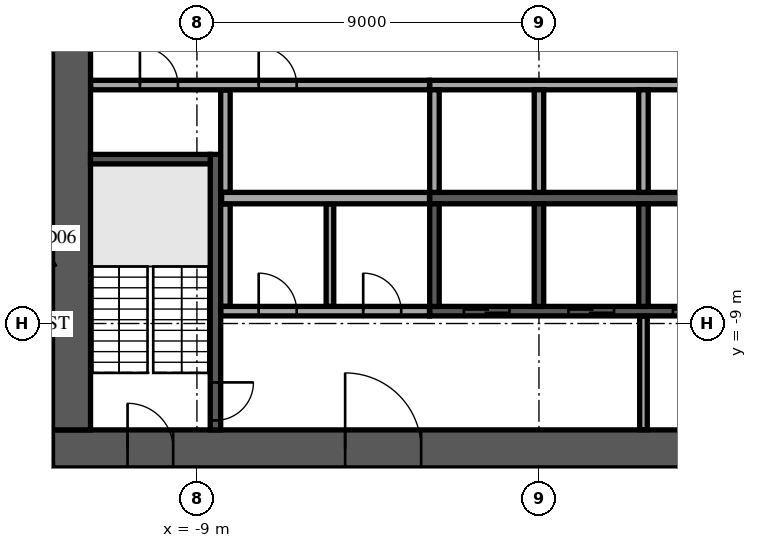
"""IFC4 building model, lengths in metres.
Left out: names, types, materials, properties, quantities, classifications, styles, units other than length and angle.
Written with IfcOpenShell. Run it as: python <this file> out.ifc"""

import sys

from ifc_helpers import new_model, si_unit, direction, frame, frame_2d, origin, place, context, subcontext, project, spatial, rectangle, extrude, element, fill, save


model = new_model("IFC4")
c1 = context("Model", 3, precision=1e-05, world=origin(), true_north=direction((0.0, 1.0)))
c2 = subcontext(c1, "Body", "Model", "MODEL_VIEW")
j1 = project(units=[si_unit("LENGTHUNIT", "METRE"), si_unit("PLANEANGLEUNIT", "RADIAN")], contexts=[c1])
p1 = place(None, origin())
s1 = spatial("IfcSite", under=j1, at=p1, CompositionType="ELEMENT")
p2 = place(p1, origin())
s2 = spatial("IfcBuilding", under=s1, at=p2, CompositionType="ELEMENT")
p3 = place(p2, frame((0.0, 0.0, 147.7)))
s3 = spatial("IfcBuildingStorey", under=s2, at=p3, CompositionType="ELEMENT", Elevation=147.7)
p4 = place(p3, frame((-12.8, -12.3, 0.0), z_axis=(0.0, 0.0, 1.0), x_axis=(1.0, 0.0, 0.0)))
e1 = element("IfcWall", 1, at=p4, inside=s3, PredefinedType="SHEAR", context=c2, shape_type="SweptSolid", body=[
    extrude(rectangle(XDim=25.6, YDim=1.0, at=frame_2d((12.8, 0.0))), origin(), (0.0, 0.0, 1.0), 3.6),
])
p5 = place(p4, frame((7.7, 0.0, 0.0)))
e2 = element("IfcOpeningElement", 2, at=p5, cuts=e1, PredefinedType="OPENING", context=c2, shape_type="SweptSolid", body=[
    extrude(rectangle(XDim=2.0, YDim=2.1, at=frame_2d((1.0, 1.05))), frame((0.0, 0.51, 0.0), z_axis=(0.0, -1.0, 0.0), x_axis=(1.0, 0.0, 0.0)), (0.0, 0.0, 1.0), 1.02),
])
p6 = place(p4, frame((17.825, 0.0, 0.0)))
e3 = element("IfcOpeningElement", 3, at=p6, cuts=e1, PredefinedType="OPENING", context=c2, shape_type="SweptSolid", body=[
    extrude(rectangle(XDim=1.2, YDim=2.1, at=frame_2d((0.6, 1.05))), frame((0.0, 0.51, 0.0), z_axis=(0.0, -1.0, 0.0), x_axis=(1.0, 0.0, 0.0)), (0.0, 0.0, 1.0), 1.02),
])
p7 = place(p4, frame((1.975, 0.0, 0.0)))
e4 = element("IfcOpeningElement", 4, at=p7, cuts=e1, PredefinedType="OPENING", context=c2, shape_type="SweptSolid", body=[
    extrude(rectangle(XDim=1.2, YDim=2.1, at=frame_2d((0.6, 1.05))), frame((0.0, 0.51, 0.0), z_axis=(0.0, -1.0, 0.0), x_axis=(1.0, 0.0, 0.0)), (0.0, 0.0, 1.0), 1.02),
])
p8 = place(p4, frame((22.425, 0.0, 0.0)))
e5 = element("IfcOpeningElement", 5, at=p8, cuts=e1, PredefinedType="OPENING", context=c2, shape_type="SweptSolid", body=[
    extrude(rectangle(XDim=1.2, YDim=2.1, at=frame_2d((0.6, 1.05))), frame((0.0, 0.51, 0.0), z_axis=(0.0, -1.0, 0.0), x_axis=(1.0, 0.0, 0.0)), (0.0, 0.0, 1.0), 1.02),
])
p9 = place(p3, frame((-12.3, -11.8, 0.0), z_axis=(0.0, 0.0, 1.0), x_axis=(0.0, 1.0, 0.0)))
e6 = element("IfcWall", 6, at=p9, inside=s3, PredefinedType="SHEAR", context=c2, shape_type="SweptSolid", body=[
    extrude(rectangle(XDim=23.6, YDim=1.0, at=frame_2d((11.8, 0.0))), origin(), (0.0, 0.0, 1.0), 3.6),
])
p10 = place(p9, frame((10.6, 0.0, 0.0)))
e7 = element("IfcOpeningElement", 7, at=p10, cuts=e6, PredefinedType="OPENING", context=c2, shape_type="SweptSolid", body=[
    extrude(rectangle(XDim=2.4, YDim=2.4, at=frame_2d((1.2, 1.2))), frame((0.0, 0.51, 0.0), z_axis=(0.0, -1.0, 0.0), x_axis=(1.0, 0.0, 0.0)), (0.0, 0.0, 1.0), 1.02),
])
p11 = place(p3, frame((-2.875, -5.7, 0.0), z_axis=(0.0, 0.0, 1.0), x_axis=(1.0, 0.0, 0.0)))
e8 = element("IfcWall", 8, at=p11, inside=s3, PredefinedType="SOLIDWALL", context=c2, shape_type="SweptSolid", body=[
    extrude(rectangle(XDim=11.25, YDim=0.3, at=frame_2d((5.625, 0.0))), origin(), (0.0, 0.0, 1.0), 3.6),
])
p12 = place(p3, frame((-2.875, -2.725, 0.0), z_axis=(0.0, 0.0, 1.0), x_axis=(1.0, 0.0, 0.0)))
e9 = element("IfcWall", 9, at=p12, inside=s3, PredefinedType="SOLIDWALL", context=c2, shape_type="SweptSolid", body=[
    extrude(rectangle(XDim=8.5, YDim=0.25, at=frame_2d((4.25, 0.0))), origin(), (0.0, 0.0, 1.0), 3.6),
])
for number, where, z_axis, x_axis in (
    (10, (-2.75, -5.55, 0.0), (0.0, 0.0, 1.0), (0.0, 1.0, 0.0)),
    (11, (0.0, -5.55, 0.0), (0.0, 0.0, 1.0), (0.0, 1.0, 0.0)),
    (12, (2.75, -5.55, 0.0), (0.0, 0.0, 1.0), (0.0, 1.0, 0.0)),
):
    element("IfcWall", number, at=place(p3, frame(where, z_axis=z_axis, x_axis=x_axis)), inside=s3, PredefinedType="SOLIDWALL", context=c2, shape_type="SweptSolid", body=[
        extrude(rectangle(XDim=2.7, YDim=0.25, at=frame_2d((1.35, 0.0))), origin(), (0.0, 0.0, 1.0), 3.6),
    ])
p13 = place(p3, frame((-2.875, -8.675, 0.0), z_axis=(0.0, 0.0, 1.0), x_axis=(1.0, 0.0, 0.0)))
e13 = element("IfcWall", 13, at=p13, inside=s3, PredefinedType="SOLIDWALL", context=c2, shape_type="SweptSolid", body=[
    extrude(rectangle(XDim=11.25, YDim=0.25, at=frame_2d((5.625, 0.0))), origin(), (0.0, 0.0, 1.0), 3.6),
])
p14 = place(p13, frame((0.9, 0.0, 0.0)))
e14 = element("IfcOpeningElement", 14, at=p14, cuts=e13, PredefinedType="OPENING", context=c2, shape_type="SweptSolid", body=[
    extrude(rectangle(XDim=1.2, YDim=2.1, at=frame_2d((0.6, 1.05))), frame((0.0, 0.135, 0.0), z_axis=(0.0, -1.0, 0.0), x_axis=(1.0, 0.0, 0.0)), (0.0, 0.0, 1.0), 0.27),
])
p15 = place(p13, frame((3.65, 0.0, 0.0)))
e15 = element("IfcOpeningElement", 15, at=p15, cuts=e13, PredefinedType="OPENING", context=c2, shape_type="SweptSolid", body=[
    extrude(rectangle(XDim=1.2, YDim=2.1, at=frame_2d((0.6, 1.05))), frame((0.0, 0.135, 0.0), z_axis=(0.0, -1.0, 0.0), x_axis=(1.0, 0.0, 0.0)), (0.0, 0.0, 1.0), 0.27),
])
p16 = place(p13, frame((6.4, 0.0, 0.0)))
e16 = element("IfcOpeningElement", 16, at=p16, cuts=e13, PredefinedType="OPENING", context=c2, shape_type="SweptSolid", body=[
    extrude(rectangle(XDim=1.2, YDim=2.1, at=frame_2d((0.6, 1.05))), frame((0.0, 0.135, 0.0), z_axis=(0.0, -1.0, 0.0), x_axis=(1.0, 0.0, 0.0)), (0.0, 0.0, 1.0), 0.27),
])
p17 = place(p13, frame((9.15, 0.0, 0.0)))
e17 = element("IfcOpeningElement", 17, at=p17, cuts=e13, PredefinedType="OPENING", context=c2, shape_type="SweptSolid", body=[
    extrude(rectangle(XDim=1.2, YDim=2.1, at=frame_2d((0.6, 1.05))), frame((0.0, 0.135, 0.0), z_axis=(0.0, -1.0, 0.0), x_axis=(1.0, 0.0, 0.0)), (0.0, 0.0, 1.0), 0.27),
])
for number, where, z_axis, x_axis in (
    (18, (-2.75, -8.55, 0.0), (0.0, 0.0, 1.0), (0.0, 1.0, 0.0)),
    (19, (0.0, -8.55, 0.0), (0.0, 0.0, 1.0), (0.0, 1.0, 0.0)),
    (20, (2.75, -8.55, 0.0), (0.0, 0.0, 1.0), (0.0, 1.0, 0.0)),
):
    element("IfcWall", number, at=place(p3, frame(where, z_axis=z_axis, x_axis=x_axis)), inside=s3, PredefinedType="SOLIDWALL", context=c2, shape_type="SweptSolid", body=[
        extrude(rectangle(XDim=2.7, YDim=0.25, at=frame_2d((1.35, 0.0))), origin(), (0.0, 0.0, 1.0), 3.6),
    ])
p18 = place(p3, frame((-8.512, -4.55, 0.0), z_axis=(0.0, 0.0, 1.0), x_axis=(0.0, -1.0, 0.0)))
e21 = element("IfcWall", 21, at=p18, inside=s3, PredefinedType="SOLIDWALL", context=c2, shape_type="SweptSolid", body=[
    extrude(rectangle(XDim=7.25, YDim=0.275, at=frame_2d((3.625, 0.0))), origin(), (0.0, 0.0, 1.0), 3.6),
])
p19 = place(p18, frame((6.0, 0.0, 0.0)))
e22 = element("IfcOpeningElement", 22, at=p19, cuts=e21, PredefinedType="OPENING", context=c2, shape_type="SweptSolid", body=[
    extrude(rectangle(XDim=1.0, YDim=2.1, at=frame_2d((0.5, 1.05))), frame((0.0, 0.147, 0.0), z_axis=(0.0, -1.0, 0.0), x_axis=(1.0, 0.0, 0.0)), (0.0, 0.0, 1.0), 0.295),
])
p20 = place(p3, frame((-8.65, -4.675, 0.0), z_axis=(0.0, 0.0, 1.0), x_axis=(-1.0, 0.0, 0.0)))
e23 = element("IfcWall", 23, at=p20, inside=s3, PredefinedType="SOLIDWALL", context=c2, shape_type="SweptSolid", body=[
    extrude(rectangle(XDim=3.15, YDim=0.25, at=frame_2d((1.575, 0.0))), origin(), (0.0, 0.0, 1.0), 3.6),
])
p21 = place(p3, frame((2.75, -11.795, 0.0), z_axis=(0.0, 0.0, 1.0), x_axis=(0.0, 1.0, 0.0)))
e24 = element("IfcWall", 24, at=p21, inside=s3, PredefinedType="PARTITIONING", context=c2, shape_type="SweptSolid", body=[
    extrude(rectangle(XDim=2.99, YDim=0.2, at=frame_2d((1.495, 0.0))), origin(), (0.0, 0.0, 1.0), 3.6),
])
p22 = place(p3, frame((-8.37, -8.675, 0.0), z_axis=(0.0, 0.0, 1.0), x_axis=(1.0, 0.0, 0.0)))
e25 = element("IfcWall", 25, at=p22, inside=s3, PredefinedType="PARTITIONING", context=c2, shape_type="SweptSolid", body=[
    extrude(rectangle(XDim=5.49, YDim=0.25, at=frame_2d((2.745, 0.0))), origin(), (0.0, 0.0, 1.0), 3.6),
])
p23 = place(p22, frame((0.995, 0.0, 0.0)))
e26 = element("IfcOpeningElement", 26, at=p23, cuts=e25, PredefinedType="OPENING", context=c2, shape_type="SweptSolid", body=[
    extrude(rectangle(XDim=1.0, YDim=2.1, at=frame_2d((0.5, 1.05))), frame((0.0, 0.135, 0.0), z_axis=(0.0, -1.0, 0.0), x_axis=(1.0, 0.0, 0.0)), (0.0, 0.0, 1.0), 0.27),
])
p24 = place(p22, frame((3.745, 0.0, 0.0)))
e27 = element("IfcOpeningElement", 27, at=p24, cuts=e25, PredefinedType="OPENING", context=c2, shape_type="SweptSolid", body=[
    extrude(rectangle(XDim=1.0, YDim=2.1, at=frame_2d((0.5, 1.05))), frame((0.0, 0.135, 0.0), z_axis=(0.0, -1.0, 0.0), x_axis=(1.0, 0.0, 0.0)), (0.0, 0.0, 1.0), 0.27),
])
p25 = place(p3, frame((-8.25, -8.545, 0.0), z_axis=(0.0, 0.0, 1.0), x_axis=(0.0, 1.0, 0.0)))
e28 = element("IfcWall", 28, at=p25, inside=s3, PredefinedType="PARTITIONING", context=c2, shape_type="SweptSolid", body=[
    extrude(rectangle(XDim=2.69, YDim=0.25, at=frame_2d((1.345, 0.0))), origin(), (0.0, 0.0, 1.0), 3.6),
])
p26 = place(p3, frame((-5.5, -8.545, 0.0), z_axis=(0.0, 0.0, 1.0), x_axis=(0.0, 1.0, 0.0)))
e29 = element("IfcWall", 29, at=p26, inside=s3, PredefinedType="PARTITIONING", context=c2, shape_type="SweptSolid", body=[
    extrude(rectangle(XDim=2.69, YDim=0.2, at=frame_2d((1.345, 0.0))), origin(), (0.0, 0.0, 1.0), 3.6),
])
p27 = place(p3, frame((-8.35, -5.7, 0.0), z_axis=(0.0, 0.0, 1.0), x_axis=(1.0, 0.0, 0.0)))
e30 = element("IfcWall", 30, at=p27, inside=s3, PredefinedType="PARTITIONING", context=c2, shape_type="SweptSolid", body=[
    extrude(rectangle(XDim=5.47, YDim=0.3, at=frame_2d((2.735, 0.0))), origin(), (0.0, 0.0, 1.0), 3.6),
])
p28 = place(p3, frame((-8.25, -5.545, 0.0), z_axis=(0.0, 0.0, 1.0), x_axis=(0.0, 1.0, 0.0)))
e31 = element("IfcWall", 31, at=p28, inside=s3, PredefinedType="PARTITIONING", context=c2, shape_type="SweptSolid", body=[
    extrude(rectangle(XDim=2.69, YDim=0.25, at=frame_2d((1.345, 0.0))), origin(), (0.0, 0.0, 1.0), 3.6),
])
p29 = place(p3, frame((-11.795, -2.725, 0.0), z_axis=(0.0, 0.0, 1.0), x_axis=(1.0, 0.0, 0.0)))
e32 = element("IfcWall", 32, at=p29, inside=s3, PredefinedType="PARTITIONING", context=c2, shape_type="SweptSolid", body=[
    extrude(rectangle(XDim=8.915, YDim=0.25, at=frame_2d((4.458, 0.0))), origin(), (0.0, 0.0, 1.0), 3.6),
])
p30 = place(p29, frame((1.295, 0.0, 0.0)))
e33 = element("IfcOpeningElement", 33, at=p30, cuts=e32, PredefinedType="OPENING", context=c2, shape_type="SweptSolid", body=[
    extrude(rectangle(XDim=1.0, YDim=2.1, at=frame_2d((0.5, 1.05))), frame((0.0, 0.135, 0.0), z_axis=(0.0, -1.0, 0.0), x_axis=(1.0, 0.0, 0.0)), (0.0, 0.0, 1.0), 0.27),
])
p31 = place(p29, frame((4.42, 0.0, 0.0)))
e34 = element("IfcOpeningElement", 34, at=p31, cuts=e32, PredefinedType="OPENING", context=c2, shape_type="SweptSolid", body=[
    extrude(rectangle(XDim=1.0, YDim=2.1, at=frame_2d((0.5, 1.05))), frame((0.0, 0.135, 0.0), z_axis=(0.0, -1.0, 0.0), x_axis=(1.0, 0.0, 0.0)), (0.0, 0.0, 1.0), 0.27),
])
p32 = place(p3, frame((-7.88, -35.184, 0.0), z_axis=(0.0, 0.0, 1.0), x_axis=(0.857165846238, 0.515040495536, 0.0)))
e35 = element("IfcWall", 35, at=p32, inside=s3, PredefinedType="STANDARD", context=c2, shape_type="SweptSolid", body=[
    extrude(rectangle(XDim=49.751, YDim=0.6, at=frame_2d((24.876, 0.0))), origin(), (0.0, 0.0, 1.0), 3.6),
])
p33 = place(p32, frame((1.161, 0.0, 0.9)))
e36 = element("IfcOpeningElement", 36, at=p33, cuts=e35, PredefinedType="OPENING", context=c2, shape_type="SweptSolid", body=[
    extrude(rectangle(XDim=2.1, YDim=2.1, at=frame_2d((1.05, 1.05))), frame((0.0, 0.31, 0.0), z_axis=(0.0, -1.0, 0.0), x_axis=(1.0, 0.0, 0.0)), (0.0, 0.0, 1.0), 0.62),
])
p34 = place(p32, frame((5.644, 0.0, 0.9)))
e37 = element("IfcOpeningElement", 37, at=p34, cuts=e35, PredefinedType="OPENING", context=c2, shape_type="SweptSolid", body=[
    extrude(rectangle(XDim=2.1, YDim=2.1, at=frame_2d((1.05, 1.05))), frame((0.0, 0.31, 0.0), z_axis=(0.0, -1.0, 0.0), x_axis=(1.0, 0.0, 0.0)), (0.0, 0.0, 1.0), 0.62),
])
p35 = place(p32, frame((10.189, 0.0, 0.9)))
e38 = element("IfcOpeningElement", 38, at=p35, cuts=e35, PredefinedType="OPENING", context=c2, shape_type="SweptSolid", body=[
    extrude(rectangle(XDim=2.1, YDim=2.1, at=frame_2d((1.05, 1.05))), frame((0.0, 0.31, 0.0), z_axis=(0.0, -1.0, 0.0), x_axis=(1.0, 0.0, 0.0)), (0.0, 0.0, 1.0), 0.62),
])
p36 = place(p32, frame((14.735, 0.0, 0.9)))
e39 = element("IfcOpeningElement", 39, at=p36, cuts=e35, PredefinedType="OPENING", context=c2, shape_type="SweptSolid", body=[
    extrude(rectangle(XDim=2.1, YDim=2.1, at=frame_2d((1.05, 1.05))), frame((0.0, 0.31, 0.0), z_axis=(0.0, -1.0, 0.0), x_axis=(1.0, 0.0, 0.0)), (0.0, 0.0, 1.0), 0.62),
])
p37 = place(p32, frame((19.28, 0.0, 0.9)))
e40 = element("IfcOpeningElement", 40, at=p37, cuts=e35, PredefinedType="OPENING", context=c2, shape_type="SweptSolid", body=[
    extrude(rectangle(XDim=2.1, YDim=2.1, at=frame_2d((1.05, 1.05))), frame((0.0, 0.31, 0.0), z_axis=(0.0, -1.0, 0.0), x_axis=(1.0, 0.0, 0.0)), (0.0, 0.0, 1.0), 0.62),
])
p38 = place(p32, frame((23.826, 0.0, 0.9)))
e41 = element("IfcOpeningElement", 41, at=p38, cuts=e35, PredefinedType="OPENING", context=c2, shape_type="SweptSolid", body=[
    extrude(rectangle(XDim=2.1, YDim=2.1, at=frame_2d((1.05, 1.05))), frame((0.0, 0.31, 0.0), z_axis=(0.0, -1.0, 0.0), x_axis=(1.0, 0.0, 0.0)), (0.0, 0.0, 1.0), 0.62),
])
p39 = place(p32, frame((28.371, 0.0, 0.9)))
e42 = element("IfcOpeningElement", 42, at=p39, cuts=e35, PredefinedType="OPENING", context=c2, shape_type="SweptSolid", body=[
    extrude(rectangle(XDim=2.1, YDim=2.1, at=frame_2d((1.05, 1.05))), frame((0.0, 0.31, 0.0), z_axis=(0.0, -1.0, 0.0), x_axis=(1.0, 0.0, 0.0)), (0.0, 0.0, 1.0), 0.62),
])
p40 = place(p32, frame((32.917, 0.0, 0.9)))
e43 = element("IfcOpeningElement", 43, at=p40, cuts=e35, PredefinedType="OPENING", context=c2, shape_type="SweptSolid", body=[
    extrude(rectangle(XDim=2.1, YDim=2.1, at=frame_2d((1.05, 1.05))), frame((0.0, 0.31, 0.0), z_axis=(0.0, -1.0, 0.0), x_axis=(1.0, 0.0, 0.0)), (0.0, 0.0, 1.0), 0.62),
])
p41 = place(p32, frame((37.462, 0.0, 0.9)))
e44 = element("IfcOpeningElement", 44, at=p41, cuts=e35, PredefinedType="OPENING", context=c2, shape_type="SweptSolid", body=[
    extrude(rectangle(XDim=2.1, YDim=2.1, at=frame_2d((1.05, 1.05))), frame((0.0, 0.31, 0.0), z_axis=(0.0, -1.0, 0.0), x_axis=(1.0, 0.0, 0.0)), (0.0, 0.0, 1.0), 0.62),
])
p42 = place(p32, frame((42.008, 0.0, 0.9)))
e45 = element("IfcOpeningElement", 45, at=p42, cuts=e35, PredefinedType="OPENING", context=c2, shape_type="SweptSolid", body=[
    extrude(rectangle(XDim=2.1, YDim=2.1, at=frame_2d((1.05, 1.05))), frame((0.0, 0.31, 0.0), z_axis=(0.0, -1.0, 0.0), x_axis=(1.0, 0.0, 0.0)), (0.0, 0.0, 1.0), 0.62),
])
p43 = place(p32, frame((46.491, 0.0, 0.9)))
e46 = element("IfcOpeningElement", 46, at=p43, cuts=e35, PredefinedType="OPENING", context=c2, shape_type="SweptSolid", body=[
    extrude(rectangle(XDim=2.1, YDim=2.1, at=frame_2d((1.05, 1.05))), frame((0.0, 0.31, 0.0), z_axis=(0.0, -1.0, 0.0), x_axis=(1.0, 0.0, 0.0)), (0.0, 0.0, 1.0), 0.62),
])
p44 = place(p3, frame((-26.388, 0.711, 0.0), z_axis=(0.0, 0.0, 1.0), x_axis=(0.515060503771, -0.857153823684, 0.0)))
e47 = element("IfcWall", 47, at=p44, inside=s3, PredefinedType="PARTITIONING", context=c2, shape_type="SweptSolid", body=[
    extrude(rectangle(XDim=28.475, YDim=0.15, at=frame_2d((14.238, 0.0))), origin(), (0.0, 0.0, 1.0), 3.15),
])
p45 = place(p44, frame((9.447, 0.0, 0.0)))
e48 = element("IfcOpeningElement", 48, at=p45, cuts=e47, PredefinedType="OPENING", context=c2, shape_type="SweptSolid", body=[
    extrude(rectangle(XDim=1.0, YDim=2.1, at=frame_2d((0.5, 1.05))), frame((0.0, 0.085, 0.0), z_axis=(0.0, -1.0, 0.0), x_axis=(1.0, 0.0, 0.0)), (0.0, 0.0, 1.0), 0.17),
])
p46 = place(p44, frame((17.021, 0.0, 0.0)))
e49 = element("IfcOpeningElement", 49, at=p46, cuts=e47, PredefinedType="OPENING", context=c2, shape_type="SweptSolid", body=[
    extrude(rectangle(XDim=1.0, YDim=2.1, at=frame_2d((0.5, 1.05))), frame((0.0, 0.085, 0.0), z_axis=(0.0, -1.0, 0.0), x_axis=(1.0, 0.0, 0.0)), (0.0, 0.0, 1.0), 0.17),
])
p47 = place(p3, frame((-17.085, -9.969, 0.0), z_axis=(0.0, 0.0, 1.0), x_axis=(0.857169540237, 0.515034347681, 0.0)))
e50 = element("IfcWall", 50, at=p47, inside=s3, PredefinedType="PARTITIONING", context=c2, shape_type="SweptSolid", body=[
    extrude(rectangle(XDim=4.999, YDim=0.15, at=frame_2d((2.499, 0.0))), origin(), (0.0, 0.0, 1.0), 3.15),
])
p48 = place(p47, frame((3.05, 0.0, 0.0)))
e51 = element("IfcOpeningElement", 51, at=p48, cuts=e50, PredefinedType="OPENING", context=c2, shape_type="SweptSolid", body=[
    extrude(rectangle(XDim=1.0, YDim=2.1, at=frame_2d((0.5, 1.05))), frame((0.0, 0.085, 0.0), z_axis=(0.0, -1.0, 0.0), x_axis=(1.0, 0.0, 0.0)), (0.0, 0.0, 1.0), 0.17),
])
p49 = place(p3, frame((-4.341, -24.661, 0.0), z_axis=(0.0, 0.0, 1.0), x_axis=(0.85716751976, 0.515037710336, 0.0)))
e52 = element("IfcWall", 52, at=p49, inside=s3, PredefinedType="PARTITIONING", context=c2, shape_type="SweptSolid", body=[
    extrude(rectangle(XDim=32.919, YDim=0.15, at=frame_2d((16.459, 0.0))), origin(), (0.0, 0.0, 1.0), 3.15),
])
p50 = place(p49, frame((11.932, 0.0, 0.0)))
e53 = element("IfcOpeningElement", 53, at=p50, cuts=e52, PredefinedType="OPENING", context=c2, shape_type="SweptSolid", body=[
    extrude(rectangle(XDim=1.0, YDim=2.1, at=frame_2d((0.5, 1.05))), frame((0.0, 0.085, 0.0), z_axis=(0.0, -1.0, 0.0), x_axis=(1.0, 0.0, 0.0)), (0.0, 0.0, 1.0), 0.17),
])
p51 = place(p49, frame((25.18, 0.0, 0.0)))
e54 = element("IfcOpeningElement", 54, at=p51, cuts=e52, PredefinedType="OPENING", context=c2, shape_type="SweptSolid", body=[
    extrude(rectangle(XDim=1.0, YDim=2.1, at=frame_2d((0.5, 1.05))), frame((0.0, 0.085, 0.0), z_axis=(0.0, -1.0, 0.0), x_axis=(1.0, 0.0, 0.0)), (0.0, 0.0, 1.0), 0.17),
])
p52 = place(p49, frame((30.035, 0.0, 0.0)))
e55 = element("IfcOpeningElement", 55, at=p52, cuts=e52, PredefinedType="OPENING", context=c2, shape_type="SweptSolid", body=[
    extrude(rectangle(XDim=1.0, YDim=2.1, at=frame_2d((0.5, 1.05))), frame((0.0, 0.085, 0.0), z_axis=(0.0, -1.0, 0.0), x_axis=(1.0, 0.0, 0.0)), (0.0, 0.0, 1.0), 0.17),
])
p53 = place(p5, origin())
e56 = element("IfcDoor", 56, at=p53, inside=s3, OperationType="SINGLE_SWING_LEFT", PredefinedType="DOOR", context=c2, shape_type="SweptSolid", body=[
    extrude(rectangle(XDim=2.0, YDim=2.1, at=frame_2d((1.0, 1.05))), frame((0.0, 0.025, 0.0), z_axis=(0.0, -1.0, 0.0), x_axis=(1.0, 0.0, 0.0)), (0.0, 0.0, 1.0), 0.05),
])
fill(e2, e56)
p54 = place(p7, origin())
e57 = element("IfcDoor", 57, at=p54, inside=s3, OperationType="SINGLE_SWING_LEFT", PredefinedType="DOOR", context=c2, shape_type="SweptSolid", body=[
    extrude(rectangle(XDim=1.2, YDim=2.1, at=frame_2d((0.6, 1.05))), frame((0.0, 0.025, 0.0), z_axis=(0.0, -1.0, 0.0), x_axis=(1.0, 0.0, 0.0)), (0.0, 0.0, 1.0), 0.05),
])
fill(e4, e57)
p55 = place(p14, origin())
e58 = element("IfcDoor", 58, at=p55, inside=s3, OperationType="DOUBLE_DOOR_SLIDING", PredefinedType="DOOR", context=c2, shape_type="SweptSolid", body=[
    extrude(rectangle(XDim=1.2, YDim=2.1, at=frame_2d((0.6, 1.05))), frame((0.0, 0.025, 0.0), z_axis=(0.0, -1.0, 0.0), x_axis=(1.0, 0.0, 0.0)), (0.0, 0.0, 1.0), 0.05),
])
fill(e14, e58)
p56 = place(p15, origin())
e59 = element("IfcDoor", 59, at=p56, inside=s3, OperationType="DOUBLE_DOOR_SLIDING", PredefinedType="DOOR", context=c2, shape_type="SweptSolid", body=[
    extrude(rectangle(XDim=1.2, YDim=2.1, at=frame_2d((0.6, 1.05))), frame((0.0, 0.025, 0.0), z_axis=(0.0, -1.0, 0.0), x_axis=(1.0, 0.0, 0.0)), (0.0, 0.0, 1.0), 0.05),
])
fill(e15, e59)
p57 = place(p16, origin())
e60 = element("IfcDoor", 60, at=p57, inside=s3, OperationType="DOUBLE_DOOR_SLIDING", PredefinedType="DOOR", context=c2, shape_type="SweptSolid", body=[
    extrude(rectangle(XDim=1.2, YDim=2.1, at=frame_2d((0.6, 1.05))), frame((0.0, 0.025, 0.0), z_axis=(0.0, -1.0, 0.0), x_axis=(1.0, 0.0, 0.0)), (0.0, 0.0, 1.0), 0.05),
])
fill(e16, e60)
p58 = place(p19, origin())
e61 = element("IfcDoor", 61, at=p58, inside=s3, OperationType="SINGLE_SWING_LEFT", PredefinedType="DOOR", context=c2, shape_type="SweptSolid", body=[
    extrude(rectangle(XDim=1.0, YDim=2.1, at=frame_2d((0.5, 1.05))), frame((0.0, 0.025, 0.0), z_axis=(0.0, -1.0, 0.0), x_axis=(1.0, 0.0, 0.0)), (0.0, 0.0, 1.0), 0.05),
])
fill(e22, e61)
p59 = place(p23, origin())
e62 = element("IfcDoor", 62, at=p59, inside=s3, OperationType="SINGLE_SWING_LEFT", PredefinedType="DOOR", context=c2, shape_type="SweptSolid", body=[
    extrude(rectangle(XDim=1.0, YDim=2.1, at=frame_2d((0.5, 1.05))), frame((0.0, 0.025, 0.0), z_axis=(0.0, -1.0, 0.0), x_axis=(1.0, 0.0, 0.0)), (0.0, 0.0, 1.0), 0.05),
])
fill(e26, e62)
p60 = place(p24, origin())
e63 = element("IfcDoor", 63, at=p60, inside=s3, OperationType="SINGLE_SWING_LEFT", PredefinedType="DOOR", context=c2, shape_type="SweptSolid", body=[
    extrude(rectangle(XDim=1.0, YDim=2.1, at=frame_2d((0.5, 1.05))), frame((0.0, 0.025, 0.0), z_axis=(0.0, -1.0, 0.0), x_axis=(1.0, 0.0, 0.0)), (0.0, 0.0, 1.0), 0.05),
])
fill(e27, e63)
p61 = place(p30, origin())
e64 = element("IfcDoor", 64, at=p61, inside=s3, OperationType="SINGLE_SWING_LEFT", PredefinedType="DOOR", context=c2, shape_type="SweptSolid", body=[
    extrude(rectangle(XDim=1.0, YDim=2.1, at=frame_2d((0.5, 1.05))), frame((0.0, 0.025, 0.0), z_axis=(0.0, -1.0, 0.0), x_axis=(1.0, 0.0, 0.0)), (0.0, 0.0, 1.0), 0.05),
])
fill(e33, e64)
p62 = place(p31, origin())
e65 = element("IfcDoor", 65, at=p62, inside=s3, OperationType="SINGLE_SWING_LEFT", PredefinedType="DOOR", context=c2, shape_type="SweptSolid", body=[
    extrude(rectangle(XDim=1.0, YDim=2.1, at=frame_2d((0.5, 1.05))), frame((0.0, 0.025, 0.0), z_axis=(0.0, -1.0, 0.0), x_axis=(1.0, 0.0, 0.0)), (0.0, 0.0, 1.0), 0.05),
])
fill(e34, e65)
save(model, sys.argv[1])
